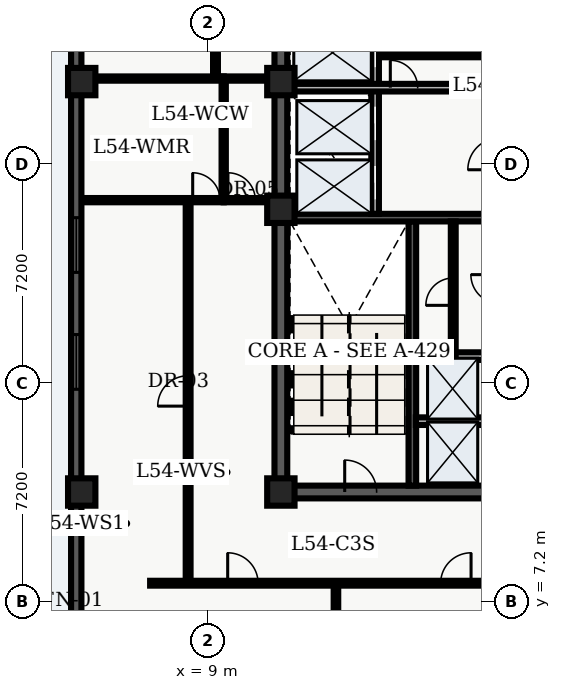
"""IFC4 building model, lengths in metres.
Left out: names, types, materials, properties, quantities, classifications, styles, units other than length and angle.
Written with IfcOpenShell. Run it as: python <this file> out.ifc"""

import sys

from ifc_helpers import new_model, entity, si_unit, converted_unit, direction, frame, origin_with_axes, origin_2d_with_axis, place, context, subcontext, project, spatial, polyline, rectangle, outline, extrude, element, fill, save


model = new_model("IFC4")
c1 = context("Model", 3, precision=1e-05, world=origin_with_axes(), true_north=direction((0.0, 1.0)))
c2 = subcontext(c1, "Body", "Model", "MODEL_VIEW")
j1 = project(units=[si_unit("LENGTHUNIT", "METRE"), converted_unit("PLANEANGLEUNIT", "DEGREE", entity("IfcPlaneAngleMeasure", 0.017), si_unit("PLANEANGLEUNIT", "RADIAN"), dimensions=[0, 0, 0, 0, 0, 0, 0])], contexts=[c1])
p1 = place(None, origin_with_axes())
s1 = spatial("IfcSite", under=j1, at=p1, CompositionType="ELEMENT")
p2 = place(p1, origin_with_axes())
s2 = spatial("IfcBuilding", under=s1, at=p2, CompositionType="ELEMENT")
p3 = place(p2, frame((0.0, 0.0, 219.9), z_axis=(0.0, 0.0, 1.0), x_axis=(1.0, 0.0, 0.0)))
s3 = spatial("IfcBuildingStorey", under=s2, at=p3, CompositionType="ELEMENT", Elevation=219.9)
p4 = place(p3, frame((11.4, 10.8, 0.0), z_axis=(0.0, 0.0, 1.0), x_axis=(0.0, 1.0, 0.0)))
e1 = element("IfcWall", 1, at=p4, inside=s3, PredefinedType="SHEAR", context=c2, shape_type="SweptSolid", body=[
    extrude(outline(polyline([(0.0, -0.21), (27.0, -0.21), (27.0, 0.21), (0.0, 0.21), (0.0, -0.21)])), origin_with_axes(), (0.0, 0.0, 1.0), 4.56),
])
p5 = place(p3, frame((11.4, 10.8, 0.0), z_axis=(0.0, 0.0, 1.0), x_axis=(1.0, 0.0, 0.0)))
e2 = element("IfcWall", 2, at=p5, inside=s3, PredefinedType="SHEAR", context=c2, shape_type="SweptSolid", body=[
    extrude(outline(polyline([(0.0, -0.21), (7.2, -0.21), (7.2, 0.21), (0.0, 0.21), (0.0, -0.21)])), origin_with_axes(), (0.0, 0.0, 1.0), 4.56),
])
p6 = place(p5, frame((2.625, 0.0, 0.0), z_axis=(0.0, 0.0, 1.0), x_axis=(1.0, 0.0, 0.0)))
e3 = element("IfcOpeningElement", 3, at=p6, cuts=e2, PredefinedType="OPENING", context=c2, shape_type="SweptSolid", body=[
    extrude(rectangle(XDim=1.05, YDim=0.44, at=origin_2d_with_axis()), origin_with_axes(), (0.0, 0.0, 1.0), 2.15),
])
p7 = place(p3, frame((15.725, 11.01, 0.0), z_axis=(0.0, 0.0, 1.0), x_axis=(0.0, 1.0, 0.0)))
e4 = element("IfcWall", 4, at=p7, inside=s3, PredefinedType="SHEAR", context=c2, shape_type="SweptSolid", body=[
    extrude(outline(polyline([(0.0, -0.125), (8.69, -0.125), (8.69, 0.125), (0.0, 0.125), (0.0, -0.125)])), origin_with_axes(), (0.0, 0.0, 1.0), 4.56),
])
p8 = place(p3, frame((11.61, 19.825, 0.0), z_axis=(0.0, 0.0, 1.0), x_axis=(1.0, 0.0, 0.0)))
e5 = element("IfcWall", 5, at=p8, inside=s3, PredefinedType="SHEAR", context=c2, shape_type="SweptSolid", body=[
    extrude(outline(polyline([(0.0, -0.125), (6.78, -0.125), (6.78, 0.125), (0.0, 0.125), (0.0, -0.125)])), origin_with_axes(), (0.0, 0.0, 1.0), 4.56),
])
p9 = place(p3, frame((14.5, 19.95, 0.0), z_axis=(0.0, 0.0, 1.0), x_axis=(0.0, 1.0, 0.0)))
e6 = element("IfcWall", 6, at=p9, inside=s3, PredefinedType="SOLIDWALL", context=c2, shape_type="SweptSolid", body=[
    extrude(outline(polyline([(0.0, -0.125), (6.25, -0.125), (6.25, 0.125), (0.0, 0.125), (0.0, -0.125)])), origin_with_axes(), (0.0, 0.0, 1.0), 3.6),
])
p10 = place(p9, frame((1.025, 0.0, 0.0), z_axis=(0.0, 0.0, 1.0), x_axis=(1.0, 0.0, 0.0)))
e7 = element("IfcOpeningElement", 7, at=p10, cuts=e6, PredefinedType="OPENING", context=c2, shape_type="SweptSolid", body=[
    extrude(rectangle(XDim=1.1, YDim=0.27, at=origin_2d_with_axis()), origin_with_axes(), (0.0, 0.0, 1.0), 2.15),
])
p11 = place(p9, frame((2.975, 0.0, 0.0), z_axis=(0.0, 0.0, 1.0), x_axis=(1.0, 0.0, 0.0)))
e8 = element("IfcOpeningElement", 8, at=p11, cuts=e6, PredefinedType="OPENING", context=c2, shape_type="SweptSolid", body=[
    extrude(rectangle(XDim=1.1, YDim=0.27, at=origin_2d_with_axis()), origin_with_axes(), (0.0, 0.0, 1.0), 2.15),
])
p12 = place(p9, frame((5.425, 0.0, 0.0), z_axis=(0.0, 0.0, 1.0), x_axis=(1.0, 0.0, 0.0)))
e9 = element("IfcOpeningElement", 9, at=p12, cuts=e6, PredefinedType="OPENING", context=c2, shape_type="SweptSolid", body=[
    extrude(rectangle(XDim=1.2, YDim=0.27, at=origin_2d_with_axis()), origin_with_axes(), (0.0, 0.0, 1.0), 2.15),
])
p13 = place(p3, frame((11.7, 24.1, 0.0), z_axis=(0.0, 0.0, 1.0), x_axis=(1.0, 0.0, 0.0)))
e10 = element("IfcWall", 10, at=p13, inside=s3, PredefinedType="SOLIDWALL", context=c2, shape_type="SweptSolid", body=[
    extrude(outline(polyline([(0.0, -0.125), (6.6, -0.125), (6.6, 0.125), (0.0, 0.125), (0.0, -0.125)])), origin_with_axes(), (0.0, 0.0, 1.0), 3.6),
])
p14 = place(p13, frame((3.75, 0.0, 0.0), z_axis=(0.0, 0.0, 1.0), x_axis=(1.0, 0.0, 0.0)))
e11 = element("IfcOpeningElement", 11, at=p14, cuts=e10, PredefinedType="OPENING", context=c2, shape_type="SweptSolid", body=[
    extrude(rectangle(XDim=0.9, YDim=0.27, at=origin_2d_with_axis()), origin_with_axes(), (0.0, 0.0, 1.0), 2.15),
])
for number, where, z_axis, x_axis in (
    (12, (11.4, 10.8, 0.0), (0.0, 0.0, 1.0), (1.0, 0.0, 0.0)),
    (13, (11.4, 20.1, 0.0), (0.0, 0.0, 1.0), (1.0, 0.0, 0.0)),
    (14, (11.4, 24.3, 0.0), (0.0, 0.0, 1.0), (1.0, 0.0, 0.0)),
    (15, (4.85, 10.8, 0.0), (0.0, 0.0, 1.0), (1.0, 0.0, 0.0)),
    (16, (4.85, 24.3, 0.0), (0.0, 0.0, 1.0), (1.0, 0.0, 0.0)),
):
    element("IfcColumn", number, at=place(p3, frame(where, z_axis=z_axis, x_axis=x_axis)), inside=s3, PredefinedType="COLUMN", context=c2, shape_type="SweptSolid", body=[
        extrude(rectangle(XDim=0.9, YDim=0.9, at=origin_2d_with_axis()), origin_with_axes(), (0.0, 0.0, 1.0), 4.8),
    ])
p15 = place(p3, frame((14.62, 25.18, 0.0), z_axis=(0.0, 0.0, 1.0), x_axis=(1.0, 0.0, 0.0)))
e17 = element("IfcWall", 17, at=p15, inside=s3, PredefinedType="PARTITIONING", context=c2, shape_type="SweptSolid", body=[
    extrude(outline(polyline([(0.0, -0.08), (3.68, -0.08), (3.68, 0.08), (0.0, 0.08), (0.0, -0.08)])), origin_with_axes(), (0.0, 0.0, 1.0), 3.2),
])
p16 = place(p15, frame((1.95, 0.0, 0.0), z_axis=(0.0, 0.0, 1.0), x_axis=(1.0, 0.0, 0.0)))
e18 = element("IfcOpeningElement", 18, at=p16, cuts=e17, PredefinedType="OPENING", context=c2, shape_type="SweptSolid", body=[
    extrude(rectangle(XDim=0.9, YDim=0.18, at=origin_2d_with_axis()), origin_with_axes(), (0.0, 0.0, 1.0), 2.15),
])
for number, where, z_axis, x_axis in (
    (19, (15.84, 13.13, 0.0), (0.0, 0.0, 1.0), (1.0, 0.0, 0.0)),
    (20, (15.84, 15.27, 0.0), (0.0, 0.0, 1.0), (1.0, 0.0, 0.0)),
):
    element("IfcWall", number, at=place(p3, frame(where, z_axis=z_axis, x_axis=x_axis)), inside=s3, PredefinedType="SOLIDWALL", context=c2, shape_type="SweptSolid", body=[
        extrude(outline(polyline([(0.0, -0.125), (2.46, -0.125), (2.46, 0.125), (0.0, 0.125), (0.0, -0.125)])), origin_with_axes(), (0.0, 0.0, 1.0), 3.2),
    ])
p17 = place(p3, frame((17.07, 15.34, 0.0), z_axis=(0.0, 0.0, 1.0), x_axis=(0.0, 1.0, 0.0)))
e21 = element("IfcWall", 21, at=p17, inside=s3, PredefinedType="PARTITIONING", context=c2, shape_type="SweptSolid", body=[
    extrude(outline(polyline([(0.0, -0.08), (4.36, -0.08), (4.36, 0.08), (0.0, 0.08), (0.0, -0.08)])), origin_with_axes(), (0.0, 0.0, 1.0), 3.2),
])
p18 = place(p17, frame((2.05, 0.0, 0.0), z_axis=(0.0, 0.0, 1.0), x_axis=(1.0, 0.0, 0.0)))
e22 = element("IfcOpeningElement", 22, at=p18, cuts=e21, PredefinedType="OPENING", context=c2, shape_type="SweptSolid", body=[
    extrude(rectangle(XDim=0.9, YDim=0.18, at=origin_2d_with_axis()), origin_with_axes(), (0.0, 0.0, 1.0), 2.15),
])
p19 = place(p3, frame((9.52, 20.4, 0.0), z_axis=(0.0, 0.0, 1.0), x_axis=(0.0, 1.0, 0.0)))
e23 = element("IfcWall", 23, at=p19, inside=s3, PredefinedType="PARTITIONING", context=c2, shape_type="SweptSolid", body=[
    extrude(outline(polyline([(0.0, -0.07), (4.0, -0.07), (4.0, 0.07), (0.0, 0.07), (0.0, -0.07)])), origin_with_axes(), (0.0, 0.0, 1.0), 3.2),
])
p20 = place(p3, frame((9.52, 20.4, 0.0), z_axis=(0.0, 0.0, 1.0), x_axis=(1.0, 0.0, 0.0)))
e24 = element("IfcWall", 24, at=p20, inside=s3, PredefinedType="PARTITIONING", context=c2, shape_type="SweptSolid", body=[
    extrude(outline(polyline([(0.0, -0.07), (1.58, -0.07), (1.58, 0.07), (0.0, 0.07), (0.0, -0.07)])), origin_with_axes(), (0.0, 0.0, 1.0), 3.2),
])
p21 = place(p20, frame((0.59, 0.0, 0.0), z_axis=(0.0, 0.0, 1.0), x_axis=(1.0, 0.0, 0.0)))
e25 = element("IfcOpeningElement", 25, at=p21, cuts=e24, PredefinedType="OPENING", context=c2, shape_type="SweptSolid", body=[
    extrude(rectangle(XDim=0.9, YDim=0.16, at=origin_2d_with_axis()), origin_with_axes(), (0.0, 0.0, 1.0), 2.15),
])
p22 = place(p3, frame((9.52, 24.4, 0.0), z_axis=(0.0, 0.0, 1.0), x_axis=(1.0, 0.0, 0.0)))
e26 = element("IfcWall", 26, at=p22, inside=s3, PredefinedType="PARTITIONING", context=c2, shape_type="SweptSolid", body=[
    extrude(outline(polyline([(0.0, -0.07), (1.58, -0.07), (1.58, 0.07), (0.0, 0.07), (0.0, -0.07)])), origin_with_axes(), (0.0, 0.0, 1.0), 3.2),
])
p23 = place(p3, frame((7.1, 7.8, 0.0), z_axis=(0.0, 0.0, 1.0), x_axis=(1.0, 0.0, 0.0)))
e27 = element("IfcWall", 27, at=p23, inside=s3, PredefinedType="PARTITIONING", context=c2, shape_type="SweptSolid", body=[
    extrude(outline(polyline([(0.0, -0.08), (14.05, -0.08), (14.05, 0.08), (0.0, 0.08), (0.0, -0.08)])), origin_with_axes(), (0.0, 0.0, 1.0), 3.2),
])
p24 = place(p23, frame((3.051, 0.0, 0.0), z_axis=(0.0, 0.0, 1.0), x_axis=(1.0, 0.0, 0.0)))
e28 = element("IfcOpeningElement", 28, at=p24, cuts=e27, PredefinedType="OPENING", context=c2, shape_type="SweptSolid", body=[
    extrude(rectangle(XDim=1.0, YDim=0.18, at=origin_2d_with_axis()), origin_with_axes(), (0.0, 0.0, 1.0), 2.15),
])
p25 = place(p23, frame((10.056, 0.0, 0.0), z_axis=(0.0, 0.0, 1.0), x_axis=(1.0, 0.0, 0.0)))
e29 = element("IfcOpeningElement", 29, at=p25, cuts=e27, PredefinedType="OPENING", context=c2, shape_type="SweptSolid", body=[
    extrude(rectangle(XDim=1.0, YDim=0.18, at=origin_2d_with_axis()), origin_with_axes(), (0.0, 0.0, 1.0), 2.15),
])
p26 = place(p3, frame((8.35, 7.8, 0.0), z_axis=(0.0, 0.0, 1.0), x_axis=(0.0, 1.0, 0.0)))
e30 = element("IfcWall", 30, at=p26, inside=s3, PredefinedType="PARTITIONING", context=c2, shape_type="SweptSolid", body=[
    extrude(outline(polyline([(0.0, -0.08), (12.6, -0.08), (12.6, 0.08), (0.0, 0.08), (0.0, -0.08)])), origin_with_axes(), (0.0, 0.0, 1.0), 3.2),
])
p27 = place(p26, frame((6.325, 0.0, 0.0), z_axis=(0.0, 0.0, 1.0), x_axis=(1.0, 0.0, 0.0)))
e31 = element("IfcOpeningElement", 31, at=p27, cuts=e30, PredefinedType="OPENING", context=c2, shape_type="SweptSolid", body=[
    extrude(rectangle(XDim=1.0, YDim=0.18, at=origin_2d_with_axis()), origin_with_axes(), (0.0, 0.0, 1.0), 2.15),
])
p28 = place(p3, frame((9.25, 24.4, 0.0), z_axis=(0.0, 0.0, 1.0), x_axis=(0.0, 1.0, 0.0)))
e32 = element("IfcWall", 32, at=p28, inside=s3, PredefinedType="PARTITIONING", context=c2, shape_type="SweptSolid", body=[
    extrude(outline(polyline([(0.0, -0.08), (16.1, -0.08), (16.1, 0.08), (0.0, 0.08), (0.0, -0.08)])), origin_with_axes(), (0.0, 0.0, 1.0), 3.2),
])
p29 = place(p28, frame((8.025, 0.0, 0.0), z_axis=(0.0, 0.0, 1.0), x_axis=(1.0, 0.0, 0.0)))
e33 = element("IfcOpeningElement", 33, at=p29, cuts=e32, PredefinedType="OPENING", context=c2, shape_type="SweptSolid", body=[
    extrude(rectangle(XDim=1.0, YDim=0.18, at=origin_2d_with_axis()), origin_with_axes(), (0.0, 0.0, 1.0), 2.15),
])
p30 = place(p3, frame((4.835, 20.4, 0.0), z_axis=(0.0, 0.0, 1.0), x_axis=(1.0, 0.0, 0.0)))
e34 = element("IfcWall", 34, at=p30, inside=s3, PredefinedType="PARTITIONING", context=c2, shape_type="SweptSolid", body=[
    extrude(outline(polyline([(0.0, -0.07), (4.685, -0.07), (4.685, 0.07), (0.0, 0.07), (0.0, -0.07)])), origin_with_axes(), (0.0, 0.0, 1.0), 3.2),
])
p31 = place(p30, frame((4.115, 0.0, 0.0), z_axis=(0.0, 0.0, 1.0), x_axis=(1.0, 0.0, 0.0)))
e35 = element("IfcOpeningElement", 35, at=p31, cuts=e34, PredefinedType="OPENING", context=c2, shape_type="SweptSolid", body=[
    extrude(rectangle(XDim=0.9, YDim=0.16, at=origin_2d_with_axis()), origin_with_axes(), (0.0, 0.0, 1.0), 2.15),
])
p32 = place(p3, frame((4.835, 24.4, 0.0), z_axis=(0.0, 0.0, 1.0), x_axis=(1.0, 0.0, 0.0)))
e36 = element("IfcWall", 36, at=p32, inside=s3, PredefinedType="PARTITIONING", context=c2, shape_type="SweptSolid", body=[
    extrude(outline(polyline([(0.0, -0.07), (4.685, -0.07), (4.685, 0.07), (0.0, 0.07), (0.0, -0.07)])), origin_with_axes(), (0.0, 0.0, 1.0), 3.2),
])
p33 = place(p3, frame((13.212, 0.335, 0.0), z_axis=(0.0, 0.0, 1.0), x_axis=(0.0, 1.0, 0.0)))
e37 = element("IfcWall", 37, at=p33, inside=s3, PredefinedType="PARTITIONING", context=c2, shape_type="SweptSolid", body=[
    extrude(outline(polyline([(0.0, -0.075), (7.365, -0.075), (7.365, 0.075), (0.0, 0.075), (0.0, -0.075)])), origin_with_axes(), (0.0, 0.0, 1.0), 3.2),
])
p34 = place(p3, frame((4.67, 2.74, 0.0), z_axis=(0.0, 0.0, 1.0), x_axis=(0.0, 1.0, 0.0)))
e38 = element("IfcWall", 38, at=p34, inside=s3, PredefinedType="SOLIDWALL", context=c2, shape_type="SweptSolid", body=[
    extrude(outline(polyline([(0.0, -0.17), (43.46, -0.17), (43.46, 0.17), (0.0, 0.17), (0.0, -0.17)])), origin_with_axes(), (0.0, 0.0, 1.0), 4.56),
])
p35 = place(p34, frame((2.948, 0.0, 0.45), z_axis=(0.0, 0.0, 1.0), x_axis=(1.0, 0.0, 0.0)))
e39 = element("IfcOpeningElement", 39, at=p35, cuts=e38, PredefinedType="OPENING", context=c2, shape_type="SweptSolid", body=[
    extrude(rectangle(XDim=1.8, YDim=0.36, at=origin_2d_with_axis()), origin_with_axes(), (0.0, 0.0, 1.0), 2.1),
])
p36 = place(p34, frame((12.339, 0.0, 0.45), z_axis=(0.0, 0.0, 1.0), x_axis=(1.0, 0.0, 0.0)))
e40 = element("IfcOpeningElement", 40, at=p36, cuts=e38, PredefinedType="OPENING", context=c2, shape_type="SweptSolid", body=[
    extrude(rectangle(XDim=1.8, YDim=0.36, at=origin_2d_with_axis()), origin_with_axes(), (0.0, 0.0, 1.0), 2.1),
])
p37 = place(p34, frame((16.184, 0.0, 0.45), z_axis=(0.0, 0.0, 1.0), x_axis=(1.0, 0.0, 0.0)))
e41 = element("IfcOpeningElement", 41, at=p37, cuts=e38, PredefinedType="OPENING", context=c2, shape_type="SweptSolid", body=[
    extrude(rectangle(XDim=1.8, YDim=0.36, at=origin_2d_with_axis()), origin_with_axes(), (0.0, 0.0, 1.0), 2.1),
])
p38 = place(p34, frame((26.426, 0.0, 0.45), z_axis=(0.0, 0.0, 1.0), x_axis=(1.0, 0.0, 0.0)))
e42 = element("IfcOpeningElement", 42, at=p38, cuts=e38, PredefinedType="OPENING", context=c2, shape_type="SweptSolid", body=[
    extrude(rectangle(XDim=1.8, YDim=0.36, at=origin_2d_with_axis()), origin_with_axes(), (0.0, 0.0, 1.0), 2.1),
])
p39 = place(p34, frame((31.121, 0.0, 0.45), z_axis=(0.0, 0.0, 1.0), x_axis=(1.0, 0.0, 0.0)))
e43 = element("IfcOpeningElement", 43, at=p39, cuts=e38, PredefinedType="OPENING", context=c2, shape_type="SweptSolid", body=[
    extrude(rectangle(XDim=1.8, YDim=0.36, at=origin_2d_with_axis()), origin_with_axes(), (0.0, 0.0, 1.0), 2.1),
])
p40 = place(p34, frame((40.062, 0.0, 0.45), z_axis=(0.0, 0.0, 1.0), x_axis=(1.0, 0.0, 0.0)))
e44 = element("IfcOpeningElement", 44, at=p40, cuts=e38, PredefinedType="OPENING", context=c2, shape_type="SweptSolid", body=[
    extrude(rectangle(XDim=1.8, YDim=0.36, at=origin_2d_with_axis()), origin_with_axes(), (0.0, 0.0, 1.0), 2.1),
])
p41 = place(p9, frame((1.025, 0.0, 0.0), z_axis=(0.0, 0.0, 1.0), x_axis=(1.0, 0.0, 0.0)))
e45 = element("IfcDoor", 45, at=p41, inside=s3, OperationType="SLIDING_TO_LEFT", PredefinedType="DOOR", context=c2, shape_type="SweptSolid", body=[
    extrude(rectangle(XDim=1.1, YDim=0.09, at=origin_2d_with_axis()), origin_with_axes(), (0.0, 0.0, 1.0), 2.15),
])
fill(e7, e45)
p42 = place(p9, frame((2.975, 0.0, 0.0), z_axis=(0.0, 0.0, 1.0), x_axis=(1.0, 0.0, 0.0)))
e46 = element("IfcDoor", 46, at=p42, inside=s3, OperationType="SLIDING_TO_RIGHT", PredefinedType="DOOR", context=c2, shape_type="SweptSolid", body=[
    extrude(rectangle(XDim=1.1, YDim=0.09, at=origin_2d_with_axis()), origin_with_axes(), (0.0, 0.0, 1.0), 2.15),
])
fill(e8, e46)
p43 = place(p9, frame((5.425, 0.0, 0.0), z_axis=(0.0, 0.0, 1.0), x_axis=(1.0, 0.0, 0.0)))
e47 = element("IfcDoor", 47, at=p43, inside=s3, OperationType="DOUBLE_DOOR_SLIDING", PredefinedType="DOOR", context=c2, shape_type="SweptSolid", body=[
    extrude(rectangle(XDim=1.2, YDim=0.09, at=origin_2d_with_axis()), origin_with_axes(), (0.0, 0.0, 1.0), 2.15),
])
fill(e9, e47)
p44 = place(p5, frame((2.625, 0.0, 0.0), z_axis=(0.0, 0.0, 1.0), x_axis=(1.0, 0.0, 0.0)))
e48 = element("IfcDoor", 48, at=p44, inside=s3, OperationType="SINGLE_SWING_LEFT", PredefinedType="DOOR", context=c2, shape_type="SweptSolid", body=[
    extrude(rectangle(XDim=1.05, YDim=0.09, at=origin_2d_with_axis()), origin_with_axes(), (0.0, 0.0, 1.0), 2.15),
])
fill(e3, e48)
p45 = place(p13, frame((3.75, 0.0, 0.0), z_axis=(0.0, 0.0, 1.0), x_axis=(1.0, 0.0, 0.0)))
e49 = element("IfcDoor", 49, at=p45, inside=s3, OperationType="SINGLE_SWING_LEFT", PredefinedType="DOOR", context=c2, shape_type="SweptSolid", body=[
    extrude(rectangle(XDim=0.9, YDim=0.09, at=origin_2d_with_axis()), origin_with_axes(), (0.0, 0.0, 1.0), 2.15),
])
fill(e11, e49)
p46 = place(p15, frame((1.95, 0.0, 0.0), z_axis=(0.0, 0.0, 1.0), x_axis=(1.0, 0.0, 0.0)))
e50 = element("IfcDoor", 50, at=p46, inside=s3, OperationType="SINGLE_SWING_LEFT", PredefinedType="DOOR", context=c2, shape_type="SweptSolid", body=[
    extrude(rectangle(XDim=0.9, YDim=0.09, at=origin_2d_with_axis()), origin_with_axes(), (0.0, 0.0, 1.0), 2.15),
])
fill(e18, e50)
p47 = place(p17, frame((2.05, 0.0, 0.0), z_axis=(0.0, 0.0, 1.0), x_axis=(1.0, 0.0, 0.0)))
e51 = element("IfcDoor", 51, at=p47, inside=s3, OperationType="SINGLE_SWING_LEFT", PredefinedType="DOOR", context=c2, shape_type="SweptSolid", body=[
    extrude(rectangle(XDim=0.9, YDim=0.09, at=origin_2d_with_axis()), origin_with_axes(), (0.0, 0.0, 1.0), 2.15),
])
fill(e22, e51)
p48 = place(p20, frame((0.59, 0.0, 0.0), z_axis=(0.0, 0.0, 1.0), x_axis=(1.0, 0.0, 0.0)))
e52 = element("IfcDoor", 52, at=p48, inside=s3, OperationType="SINGLE_SWING_LEFT", PredefinedType="DOOR", context=c2, shape_type="SweptSolid", body=[
    extrude(rectangle(XDim=0.9, YDim=0.084, at=origin_2d_with_axis()), origin_with_axes(), (0.0, 0.0, 1.0), 2.15),
])
fill(e25, e52)
p49 = place(p30, frame((4.115, 0.0, 0.0), z_axis=(0.0, 0.0, 1.0), x_axis=(1.0, 0.0, 0.0)))
e53 = element("IfcDoor", 53, at=p49, inside=s3, OperationType="SINGLE_SWING_LEFT", PredefinedType="DOOR", context=c2, shape_type="SweptSolid", body=[
    extrude(rectangle(XDim=0.9, YDim=0.084, at=origin_2d_with_axis()), origin_with_axes(), (0.0, 0.0, 1.0), 2.15),
])
fill(e35, e53)
p50 = place(p26, frame((6.325, 0.0, 0.0), z_axis=(0.0, 0.0, 1.0), x_axis=(1.0, 0.0, 0.0)))
e54 = element("IfcDoor", 54, at=p50, inside=s3, OperationType="SINGLE_SWING_LEFT", PredefinedType="DOOR", context=c2, shape_type="SweptSolid", body=[
    extrude(rectangle(XDim=1.0, YDim=0.09, at=origin_2d_with_axis()), origin_with_axes(), (0.0, 0.0, 1.0), 2.15),
])
fill(e31, e54)
p51 = place(p23, frame((3.051, 0.0, 0.0), z_axis=(0.0, 0.0, 1.0), x_axis=(1.0, 0.0, 0.0)))
e55 = element("IfcDoor", 55, at=p51, inside=s3, OperationType="SINGLE_SWING_LEFT", PredefinedType="DOOR", context=c2, shape_type="SweptSolid", body=[
    extrude(rectangle(XDim=1.0, YDim=0.09, at=origin_2d_with_axis()), origin_with_axes(), (0.0, 0.0, 1.0), 2.15),
])
fill(e28, e55)
p52 = place(p23, frame((10.056, 0.0, 0.0), z_axis=(0.0, 0.0, 1.0), x_axis=(1.0, 0.0, 0.0)))
e56 = element("IfcDoor", 56, at=p52, inside=s3, OperationType="SINGLE_SWING_RIGHT", PredefinedType="DOOR", context=c2, shape_type="SweptSolid", body=[
    extrude(rectangle(XDim=1.0, YDim=0.09, at=origin_2d_with_axis()), origin_with_axes(), (0.0, 0.0, 1.0), 2.15),
])
fill(e29, e56)
p53 = place(p34, frame((12.339, 0.0, 0.45), z_axis=(0.0, 0.0, 1.0), x_axis=(1.0, 0.0, 0.0)))
e57 = element("IfcWindow", 57, at=p53, inside=s3, PredefinedType="WINDOW", context=c2, shape_type="SweptSolid", body=[
    extrude(rectangle(XDim=1.8, YDim=0.09, at=origin_2d_with_axis()), origin_with_axes(), (0.0, 0.0, 1.0), 2.1),
])
fill(e40, e57)
p54 = place(p34, frame((16.184, 0.0, 0.45), z_axis=(0.0, 0.0, 1.0), x_axis=(1.0, 0.0, 0.0)))
e58 = element("IfcWindow", 58, at=p54, inside=s3, PredefinedType="WINDOW", context=c2, shape_type="SweptSolid", body=[
    extrude(rectangle(XDim=1.8, YDim=0.09, at=origin_2d_with_axis()), origin_with_axes(), (0.0, 0.0, 1.0), 2.1),
])
fill(e41, e58)
save(model, sys.argv[1])
